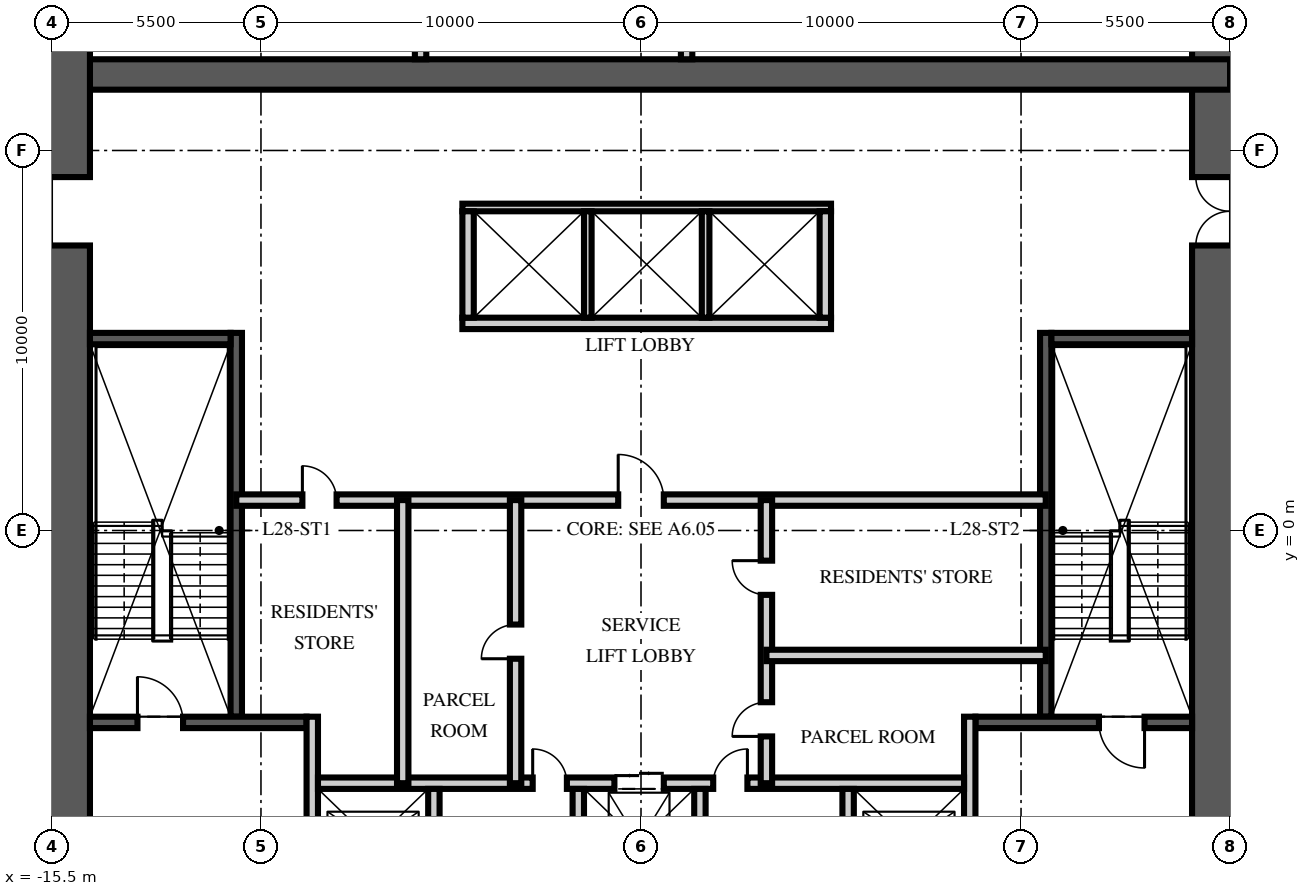
"""IFC4 building model, lengths in metres.
Left out: names, types, materials, properties, quantities, classifications, styles, units other than length and angle.
Written with IfcOpenShell. Run it as: python <this file> out.ifc"""

import sys

from ifc_helpers import new_model, si_unit, direction, frame, frame_2d, origin, place, context, subcontext, project, spatial, rectangle, extrude, element, fill, save


model = new_model("IFC4")
c1 = context("Model", 3, precision=1e-05, world=origin(), true_north=direction((0.0, 1.0)))
c2 = subcontext(c1, "Body", "Model", "MODEL_VIEW")
j1 = project(units=[si_unit("LENGTHUNIT", "METRE"), si_unit("PLANEANGLEUNIT", "RADIAN")], contexts=[c1])
p1 = place(None, origin())
s1 = spatial("IfcSite", under=j1, at=p1, CompositionType="ELEMENT")
p2 = place(p1, origin())
s2 = spatial("IfcBuilding", under=s1, at=p2, CompositionType="ELEMENT")
p3 = place(p2, frame((0.0, 0.0, 114.75)))
s3 = spatial("IfcBuildingStorey", under=s2, at=p3, CompositionType="ELEMENT", Elevation=114.75)
p4 = place(p3, frame((15.5, -15.5, -0.25), z_axis=(0.0, 0.0, 1.0), x_axis=(0.0, 1.0, 0.0)))
e1 = element("IfcWall", 1, at=p4, inside=s3, PredefinedType="SHEAR", context=c2, shape_type="SweptSolid", body=[
    extrude(rectangle(XDim=31.0, YDim=2.0, at=frame_2d((15.5, 0.0))), origin(), (0.0, 0.0, 1.0), 3.75),
])
p5 = place(p4, frame((6.5, 0.0, 0.25)))
e2 = element("IfcOpeningElement", 2, at=p5, cuts=e1, PredefinedType="OPENING", context=c2, shape_type="SweptSolid", body=[
    extrude(rectangle(XDim=1.2, YDim=2.1, at=frame_2d((0.6, 1.05))), frame((0.0, 1.01, 0.0), z_axis=(0.0, -1.0, 0.0), x_axis=(1.0, 0.0, 0.0)), (0.0, 0.0, 1.0), 2.02),
])
p6 = place(p4, frame((23.0, 0.0, 0.25)))
e3 = element("IfcOpeningElement", 3, at=p6, cuts=e1, PredefinedType="OPENING", context=c2, shape_type="SweptSolid", body=[
    extrude(rectangle(XDim=1.8, YDim=2.1, at=frame_2d((0.9, 1.05))), frame((0.0, 1.01, 0.0), z_axis=(0.0, -1.0, 0.0), x_axis=(1.0, 0.0, 0.0)), (0.0, 0.0, 1.0), 2.02),
])
p7 = place(p3, frame((-15.5, 12.0, -0.25), z_axis=(0.0, 0.0, 1.0), x_axis=(1.0, 0.0, 0.0)))
e4 = element("IfcWall", 4, at=p7, inside=s3, PredefinedType="SHEAR", context=c2, shape_type="SweptSolid", body=[
    extrude(rectangle(XDim=31.0, YDim=0.8, at=frame_2d((15.5, 0.0))), origin(), (0.0, 0.0, 1.0), 3.75),
])
p8 = place(p3, frame((-15.5, -15.5, -0.25), z_axis=(0.0, 0.0, 1.0), x_axis=(0.0, 1.0, 0.0)))
e5 = element("IfcWall", 5, at=p8, inside=s3, PredefinedType="SHEAR", context=c2, shape_type="SweptSolid", body=[
    extrude(rectangle(XDim=31.0, YDim=2.0, at=frame_2d((15.5, 0.0))), origin(), (0.0, 0.0, 1.0), 3.75),
])
p9 = place(p8, frame((6.5, 0.0, 0.25)))
e6 = element("IfcOpeningElement", 6, at=p9, cuts=e5, PredefinedType="OPENING", context=c2, shape_type="SweptSolid", body=[
    extrude(rectangle(XDim=1.2, YDim=2.1, at=frame_2d((0.6, 1.05))), frame((0.0, 1.01, 0.0), z_axis=(0.0, -1.0, 0.0), x_axis=(1.0, 0.0, 0.0)), (0.0, 0.0, 1.0), 2.02),
])
p10 = place(p8, frame((23.0, 0.0, 0.25)))
e7 = element("IfcOpeningElement", 7, at=p10, cuts=e5, PredefinedType="OPENING", context=c2, shape_type="SweptSolid", body=[
    extrude(rectangle(XDim=1.8, YDim=2.1, at=frame_2d((0.9, 1.05))), frame((0.0, 1.01, 0.0), z_axis=(0.0, -1.0, 0.0), x_axis=(1.0, 0.0, 0.0)), (0.0, 0.0, 1.0), 2.02),
])
p11 = place(p3, frame((-10.65, -4.9, 0.0), z_axis=(0.0, 0.0, 1.0), x_axis=(0.0, 1.0, 0.0)))
e8 = element("IfcWall", 8, at=p11, inside=s3, PredefinedType="SOLIDWALL", context=c2, shape_type="SweptSolid", body=[
    extrude(rectangle(XDim=10.1, YDim=0.3, at=frame_2d((5.05, 0.0))), origin(), (0.0, 0.0, 1.0), 3.5),
])
p12 = place(p3, frame((-14.5, -5.05, 0.0), z_axis=(0.0, 0.0, 1.0), x_axis=(1.0, 0.0, 0.0)))
e9 = element("IfcWall", 9, at=p12, inside=s3, PredefinedType="SOLIDWALL", context=c2, shape_type="SweptSolid", body=[
    extrude(rectangle(XDim=5.7, YDim=0.3, at=frame_2d((2.85, 0.0))), origin(), (0.0, 0.0, 1.0), 3.5),
])
p13 = place(p12, frame((1.25, 0.0, 0.0)))
e10 = element("IfcOpeningElement", 10, at=p13, cuts=e9, PredefinedType="OPENING", context=c2, shape_type="SweptSolid", body=[
    extrude(rectangle(XDim=1.2, YDim=2.1, at=frame_2d((0.6, 1.05))), frame((0.0, 0.16, 0.0), z_axis=(0.0, -1.0, 0.0), x_axis=(1.0, 0.0, 0.0)), (0.0, 0.0, 1.0), 0.32),
])
p14 = place(p3, frame((-14.5, 5.05, 0.0), z_axis=(0.0, 0.0, 1.0), x_axis=(1.0, 0.0, 0.0)))
e11 = element("IfcWall", 11, at=p14, inside=s3, PredefinedType="SOLIDWALL", context=c2, shape_type="SweptSolid", body=[
    extrude(rectangle(XDim=3.7, YDim=0.3, at=frame_2d((1.85, 0.0))), origin(), (0.0, 0.0, 1.0), 3.5),
])
p15 = place(p3, frame((-8.65, -11.6, 0.0), z_axis=(0.0, 0.0, 1.0), x_axis=(0.0, 1.0, 0.0)))
e12 = element("IfcWall", 12, at=p15, inside=s3, PredefinedType="PARTITIONING", context=c2, shape_type="SweptSolid", body=[
    extrude(rectangle(XDim=6.7, YDim=0.3, at=frame_2d((3.35, 0.0))), origin(), (0.0, 0.0, 1.0), 3.5),
])
p16 = place(p15, frame((2.85, 0.0, 0.0)))
e13 = element("IfcOpeningElement", 13, at=p16, cuts=e12, PredefinedType="OPENING", context=c2, shape_type="SweptSolid", body=[
    extrude(rectangle(XDim=1.1, YDim=2.1, at=frame_2d((0.55, 1.05))), frame((0.0, 0.16, 0.0), z_axis=(0.0, -1.0, 0.0), x_axis=(1.0, 0.0, 0.0)), (0.0, 0.0, 1.0), 0.32),
])
p17 = place(p3, frame((10.65, -4.9, 0.0), z_axis=(0.0, 0.0, 1.0), x_axis=(0.0, 1.0, 0.0)))
e14 = element("IfcWall", 14, at=p17, inside=s3, PredefinedType="SOLIDWALL", context=c2, shape_type="SweptSolid", body=[
    extrude(rectangle(XDim=10.1, YDim=0.3, at=frame_2d((5.05, 0.0))), origin(), (0.0, 0.0, 1.0), 3.5),
])
p18 = place(p3, frame((14.5, -5.05, 0.0), z_axis=(0.0, 0.0, 1.0), x_axis=(-1.0, 0.0, 0.0)))
e15 = element("IfcWall", 15, at=p18, inside=s3, PredefinedType="SOLIDWALL", context=c2, shape_type="SweptSolid", body=[
    extrude(rectangle(XDim=5.7, YDim=0.3, at=frame_2d((2.85, 0.0))), origin(), (0.0, 0.0, 1.0), 3.5),
])
p19 = place(p18, frame((1.25, 0.0, 0.0)))
e16 = element("IfcOpeningElement", 16, at=p19, cuts=e15, PredefinedType="OPENING", context=c2, shape_type="SweptSolid", body=[
    extrude(rectangle(XDim=1.2, YDim=2.1, at=frame_2d((0.6, 1.05))), frame((0.0, 0.16, 0.0), z_axis=(0.0, -1.0, 0.0), x_axis=(1.0, 0.0, 0.0)), (0.0, 0.0, 1.0), 0.32),
])
p20 = place(p3, frame((14.5, 5.05, 0.0), z_axis=(0.0, 0.0, 1.0), x_axis=(-1.0, 0.0, 0.0)))
e17 = element("IfcWall", 17, at=p20, inside=s3, PredefinedType="SOLIDWALL", context=c2, shape_type="SweptSolid", body=[
    extrude(rectangle(XDim=3.7, YDim=0.3, at=frame_2d((1.85, 0.0))), origin(), (0.0, 0.0, 1.0), 3.5),
])
p21 = place(p3, frame((8.65, -11.6, 0.0), z_axis=(0.0, 0.0, 1.0), x_axis=(0.0, 1.0, 0.0)))
e18 = element("IfcWall", 18, at=p21, inside=s3, PredefinedType="PARTITIONING", context=c2, shape_type="SweptSolid", body=[
    extrude(rectangle(XDim=6.7, YDim=0.3, at=frame_2d((3.35, 0.0))), origin(), (0.0, 0.0, 1.0), 3.5),
])
p22 = place(p21, frame((2.85, 0.0, 0.0)))
e19 = element("IfcOpeningElement", 19, at=p22, cuts=e18, PredefinedType="OPENING", context=c2, shape_type="SweptSolid", body=[
    extrude(rectangle(XDim=1.1, YDim=2.1, at=frame_2d((0.55, 1.05))), frame((0.0, 0.16, 0.0), z_axis=(0.0, -1.0, 0.0), x_axis=(1.0, 0.0, 0.0)), (0.0, 0.0, 1.0), 0.32),
])
p23 = place(p3, frame((-8.5, -6.65, 0.0), z_axis=(0.0, 0.0, 1.0), x_axis=(1.0, 0.0, 0.0)))
e20 = element("IfcWall", 20, at=p23, inside=s3, PredefinedType="PARTITIONING", context=c2, shape_type="SweptSolid", body=[
    extrude(rectangle(XDim=17.0, YDim=0.3, at=frame_2d((8.5, 0.0))), origin(), (0.0, 0.0, 1.0), 3.5),
])
p24 = place(p23, frame((7.8, 0.0, 0.0)))
e21 = element("IfcOpeningElement", 21, at=p24, cuts=e20, PredefinedType="OPENING", context=c2, shape_type="SweptSolid", body=[
    extrude(rectangle(XDim=1.3, YDim=2.4, at=frame_2d((0.65, 1.2))), frame((0.0, 0.16, 0.0), z_axis=(0.0, -1.0, 0.0), x_axis=(1.0, 0.0, 0.0)), (0.0, 0.0, 1.0), 0.32),
])
p25 = place(p23, frame((5.65, 0.0, 0.0)))
e22 = element("IfcOpeningElement", 22, at=p25, cuts=e20, PredefinedType="OPENING", context=c2, shape_type="SweptSolid", body=[
    extrude(rectangle(XDim=0.9, YDim=2.1, at=frame_2d((0.45, 1.05))), frame((0.0, 0.16, 0.0), z_axis=(0.0, -1.0, 0.0), x_axis=(1.0, 0.0, 0.0)), (0.0, 0.0, 1.0), 0.32),
])
p26 = place(p23, frame((10.4, 0.0, 0.0)))
e23 = element("IfcOpeningElement", 23, at=p26, cuts=e20, PredefinedType="OPENING", context=c2, shape_type="SweptSolid", body=[
    extrude(rectangle(XDim=0.9, YDim=2.1, at=frame_2d((0.45, 1.05))), frame((0.0, 0.16, 0.0), z_axis=(0.0, -1.0, 0.0), x_axis=(1.0, 0.0, 0.0)), (0.0, 0.0, 1.0), 0.32),
])
for number, where, z_axis, x_axis in (
    (24, (-5.45, -11.6, 0.0), (0.0, 0.0, 1.0), (0.0, 1.0, 0.0)),
    (25, (-1.65, -11.6, 0.0), (0.0, 0.0, 1.0), (0.0, 1.0, 0.0)),
    (26, (1.55, -11.6, 0.0), (0.0, 0.0, 1.0), (0.0, 1.0, 0.0)),
    (27, (5.45, -11.6, 0.0), (0.0, 0.0, 1.0), (0.0, 1.0, 0.0)),
):
    element("IfcWall", number, at=place(p3, frame(where, z_axis=z_axis, x_axis=x_axis)), inside=s3, PredefinedType="PARTITIONING", context=c2, shape_type="SweptSolid", body=[
        extrude(rectangle(XDim=4.8, YDim=0.3, at=frame_2d((2.4, 0.0))), origin(), (0.0, 0.0, 1.0), 3.5),
    ])
p27 = place(p3, frame((-4.7, 5.45, 0.0), z_axis=(0.0, 0.0, 1.0), x_axis=(1.0, 0.0, 0.0)))
e28 = element("IfcWall", 28, at=p27, inside=s3, PredefinedType="PARTITIONING", context=c2, shape_type="SweptSolid", body=[
    extrude(rectangle(XDim=9.7, YDim=0.3, at=frame_2d((4.85, 0.0))), origin(), (0.0, 0.0, 1.0), 3.5),
])
p28 = place(p3, frame((-4.7, 8.5, 0.0), z_axis=(0.0, 0.0, 1.0), x_axis=(1.0, 0.0, 0.0)))
e29 = element("IfcWall", 29, at=p28, inside=s3, PredefinedType="PARTITIONING", context=c2, shape_type="SweptSolid", body=[
    extrude(rectangle(XDim=9.7, YDim=0.2, at=frame_2d((4.85, 0.0))), origin(), (0.0, 0.0, 1.0), 3.5),
])
for number, where, z_axis, x_axis in (
    (30, (-4.55, 5.6, 0.0), (0.0, 0.0, 1.0), (0.0, 1.0, 0.0)),
    (31, (4.85, 5.6, 0.0), (0.0, 0.0, 1.0), (0.0, 1.0, 0.0)),
):
    element("IfcWall", number, at=place(p3, frame(where, z_axis=z_axis, x_axis=x_axis)), inside=s3, PredefinedType="PARTITIONING", context=c2, shape_type="SweptSolid", body=[
        extrude(rectangle(XDim=2.8, YDim=0.3, at=frame_2d((1.4, 0.0))), origin(), (0.0, 0.0, 1.0), 3.5),
    ])
for number, where, z_axis, x_axis in (
    (32, (-1.4, 5.6, 0.0), (0.0, 0.0, 1.0), (0.0, 1.0, 0.0)),
    (33, (1.7, 5.6, 0.0), (0.0, 0.0, 1.0), (0.0, 1.0, 0.0)),
):
    element("IfcWall", number, at=place(p3, frame(where, z_axis=z_axis, x_axis=x_axis)), inside=s3, PredefinedType="PARTITIONING", context=c2, shape_type="SweptSolid", body=[
        extrude(rectangle(XDim=2.8, YDim=0.2, at=frame_2d((1.4, 0.0))), origin(), (0.0, 0.0, 1.0), 3.5),
    ])
p29 = place(p3, frame((-10.65, 0.8, 0.0), z_axis=(0.0, 0.0, 1.0), x_axis=(1.0, 0.0, 0.0)))
e34 = element("IfcWall", 34, at=p29, inside=s3, PredefinedType="PARTITIONING", context=c2, shape_type="SweptSolid", body=[
    extrude(rectangle(XDim=21.3, YDim=0.3, at=frame_2d((10.65, 0.0))), origin(), (0.0, 0.0, 1.0), 3.5),
])
p30 = place(p29, frame((10.05, 0.0, 0.0)))
e35 = element("IfcOpeningElement", 35, at=p30, cuts=e34, PredefinedType="OPENING", context=c2, shape_type="SweptSolid", body=[
    extrude(rectangle(XDim=1.2, YDim=2.1, at=frame_2d((0.6, 1.05))), frame((0.0, 0.16, 0.0), z_axis=(0.0, -1.0, 0.0), x_axis=(1.0, 0.0, 0.0)), (0.0, 0.0, 1.0), 0.32),
])
p31 = place(p29, frame((1.74, 0.0, 0.0)))
e36 = element("IfcOpeningElement", 36, at=p31, cuts=e34, PredefinedType="OPENING", context=c2, shape_type="SweptSolid", body=[
    extrude(rectangle(XDim=0.9, YDim=2.1, at=frame_2d((0.45, 1.05))), frame((0.0, 0.16, 0.0), z_axis=(0.0, -1.0, 0.0), x_axis=(1.0, 0.0, 0.0)), (0.0, 0.0, 1.0), 0.32),
])
p32 = place(p3, frame((-3.3, -6.65, 0.0), z_axis=(0.0, 0.0, 1.0), x_axis=(0.0, 1.0, 0.0)))
e37 = element("IfcWall", 37, at=p32, inside=s3, PredefinedType="PARTITIONING", context=c2, shape_type="SweptSolid", body=[
    extrude(rectangle(XDim=7.45, YDim=0.3, at=frame_2d((3.725, 0.0))), origin(), (0.0, 0.0, 1.0), 3.5),
])
p33 = place(p32, frame((3.275, 0.0, 0.0)))
e38 = element("IfcOpeningElement", 38, at=p33, cuts=e37, PredefinedType="OPENING", context=c2, shape_type="SweptSolid", body=[
    extrude(rectangle(XDim=0.9, YDim=2.1, at=frame_2d((0.45, 1.05))), frame((0.0, 0.16, 0.0), z_axis=(0.0, -1.0, 0.0), x_axis=(1.0, 0.0, 0.0)), (0.0, 0.0, 1.0), 0.32),
])
p34 = place(p3, frame((3.3, -6.65, 0.0), z_axis=(0.0, 0.0, 1.0), x_axis=(0.0, 1.0, 0.0)))
e39 = element("IfcWall", 39, at=p34, inside=s3, PredefinedType="PARTITIONING", context=c2, shape_type="SweptSolid", body=[
    extrude(rectangle(XDim=7.45, YDim=0.3, at=frame_2d((3.725, 0.0))), origin(), (0.0, 0.0, 1.0), 3.5),
])
p35 = place(p34, frame((1.231, 0.0, 0.0)))
e40 = element("IfcOpeningElement", 40, at=p35, cuts=e39, PredefinedType="OPENING", context=c2, shape_type="SweptSolid", body=[
    extrude(rectangle(XDim=0.9, YDim=2.1, at=frame_2d((0.45, 1.05))), frame((0.0, 0.16, 0.0), z_axis=(0.0, -1.0, 0.0), x_axis=(1.0, 0.0, 0.0)), (0.0, 0.0, 1.0), 0.32),
])
p36 = place(p34, frame((4.956, 0.0, 0.0)))
e41 = element("IfcOpeningElement", 41, at=p36, cuts=e39, PredefinedType="OPENING", context=c2, shape_type="SweptSolid", body=[
    extrude(rectangle(XDim=0.9, YDim=2.1, at=frame_2d((0.45, 1.05))), frame((0.0, 0.16, 0.0), z_axis=(0.0, -1.0, 0.0), x_axis=(1.0, 0.0, 0.0)), (0.0, 0.0, 1.0), 0.32),
])
p37 = place(p3, frame((-6.27, -6.65, 0.0), z_axis=(0.0, 0.0, 1.0), x_axis=(0.0, 1.0, 0.0)))
e42 = element("IfcWall", 42, at=p37, inside=s3, PredefinedType="PARTITIONING", context=c2, shape_type="SweptSolid", body=[
    extrude(rectangle(XDim=7.45, YDim=0.3, at=frame_2d((3.725, 0.0))), origin(), (0.0, 0.0, 1.0), 3.5),
])
p38 = place(p3, frame((10.65, -3.288, 0.0), z_axis=(0.0, 0.0, 1.0), x_axis=(-1.0, 0.0, 0.0)))
e43 = element("IfcWall", 43, at=p38, inside=s3, PredefinedType="PARTITIONING", context=c2, shape_type="SweptSolid", body=[
    extrude(rectangle(XDim=7.35, YDim=0.3, at=frame_2d((3.675, 0.0))), origin(), (0.0, 0.0, 1.0), 3.5),
])
p39 = place(p3, frame((-5.8, 12.4, 0.0), z_axis=(0.0, 0.0, 1.0), x_axis=(0.0, 1.0, 0.0)))
e44 = element("IfcWall", 44, at=p39, inside=s3, PredefinedType="PARTITIONING", context=c2, shape_type="SweptSolid", body=[
    extrude(rectangle(XDim=2.1, YDim=0.3, at=frame_2d((1.05, 0.0))), origin(), (0.0, 0.0, 1.0), 3.5),
])
p40 = place(p39, frame((0.6, 0.0, 0.0)))
e45 = element("IfcOpeningElement", 45, at=p40, cuts=e44, PredefinedType="OPENING", context=c2, shape_type="SweptSolid", body=[
    extrude(rectangle(XDim=0.9, YDim=2.1, at=frame_2d((0.45, 1.05))), frame((0.0, 0.16, 0.0), z_axis=(0.0, -1.0, 0.0), x_axis=(1.0, 0.0, 0.0)), (0.0, 0.0, 1.0), 0.32),
])
p41 = place(p3, frame((1.2, 12.4, 0.0), z_axis=(0.0, 0.0, 1.0), x_axis=(0.0, 1.0, 0.0)))
e46 = element("IfcWall", 46, at=p41, inside=s3, PredefinedType="PARTITIONING", context=c2, shape_type="SweptSolid", body=[
    extrude(rectangle(XDim=2.1, YDim=0.3, at=frame_2d((1.05, 0.0))), origin(), (0.0, 0.0, 1.0), 3.5),
])
p42 = place(p41, frame((0.6, 0.0, 0.0)))
e47 = element("IfcOpeningElement", 47, at=p42, cuts=e46, PredefinedType="OPENING", context=c2, shape_type="SweptSolid", body=[
    extrude(rectangle(XDim=0.9, YDim=2.1, at=frame_2d((0.45, 1.05))), frame((0.0, 0.16, 0.0), z_axis=(0.0, -1.0, 0.0), x_axis=(1.0, 0.0, 0.0)), (0.0, 0.0, 1.0), 0.32),
])
p43 = place(p13, origin())
e48 = element("IfcDoor", 48, at=p43, inside=s3, OperationType="SINGLE_SWING_LEFT", PredefinedType="DOOR", context=c2, shape_type="SweptSolid", body=[
    extrude(rectangle(XDim=1.2, YDim=2.1, at=frame_2d((0.6, 1.05))), frame((0.0, 0.025, 0.0), z_axis=(0.0, -1.0, 0.0), x_axis=(1.0, 0.0, 0.0)), (0.0, 0.0, 1.0), 0.05),
])
fill(e10, e48)
p44 = place(p10, origin())
e49 = element("IfcDoor", 49, at=p44, inside=s3, OperationType="DOUBLE_DOOR_SINGLE_SWING", PredefinedType="DOOR", context=c2, shape_type="SweptSolid", body=[
    extrude(rectangle(XDim=1.8, YDim=2.1, at=frame_2d((0.9, 1.05))), frame((0.0, 0.025, 0.0), z_axis=(0.0, -1.0, 0.0), x_axis=(1.0, 0.0, 0.0)), (0.0, 0.0, 1.0), 0.05),
])
fill(e7, e49)
p45 = place(p19, origin())
e50 = element("IfcDoor", 50, at=p45, inside=s3, OperationType="SINGLE_SWING_LEFT", PredefinedType="DOOR", context=c2, shape_type="SweptSolid", body=[
    extrude(rectangle(XDim=1.2, YDim=2.1, at=frame_2d((0.6, 1.05))), frame((0.0, 0.025, 0.0), z_axis=(0.0, -1.0, 0.0), x_axis=(1.0, 0.0, 0.0)), (0.0, 0.0, 1.0), 0.05),
])
fill(e16, e50)
p46 = place(p6, origin())
e51 = element("IfcDoor", 51, at=p46, inside=s3, OperationType="DOUBLE_DOOR_SINGLE_SWING", PredefinedType="DOOR", context=c2, shape_type="SweptSolid", body=[
    extrude(rectangle(XDim=1.8, YDim=2.1, at=frame_2d((0.9, 1.05))), frame((0.0, 0.025, 0.0), z_axis=(0.0, -1.0, 0.0), x_axis=(1.0, 0.0, 0.0)), (0.0, 0.0, 1.0), 0.05),
])
fill(e3, e51)
p47 = place(p24, origin())
e52 = element("IfcDoor", 52, at=p47, inside=s3, OperationType="DOUBLE_DOOR_SLIDING", PredefinedType="DOOR", context=c2, shape_type="SweptSolid", body=[
    extrude(rectangle(XDim=1.3, YDim=2.4, at=frame_2d((0.65, 1.2))), frame((0.0, 0.025, 0.0), z_axis=(0.0, -1.0, 0.0), x_axis=(1.0, 0.0, 0.0)), (0.0, 0.0, 1.0), 0.05),
])
fill(e21, e52)
p48 = place(p30, origin())
e53 = element("IfcDoor", 53, at=p48, inside=s3, OperationType="SINGLE_SWING_LEFT", PredefinedType="DOOR", context=c2, shape_type="SweptSolid", body=[
    extrude(rectangle(XDim=1.2, YDim=2.1, at=frame_2d((0.6, 1.05))), frame((0.0, 0.025, 0.0), z_axis=(0.0, -1.0, 0.0), x_axis=(1.0, 0.0, 0.0)), (0.0, 0.0, 1.0), 0.05),
])
fill(e35, e53)
p49 = place(p25, origin())
e54 = element("IfcDoor", 54, at=p49, inside=s3, OperationType="SINGLE_SWING_LEFT", PredefinedType="DOOR", context=c2, shape_type="SweptSolid", body=[
    extrude(rectangle(XDim=0.9, YDim=2.1, at=frame_2d((0.45, 1.05))), frame((0.0, 0.025, 0.0), z_axis=(0.0, -1.0, 0.0), x_axis=(1.0, 0.0, 0.0)), (0.0, 0.0, 1.0), 0.05),
])
fill(e22, e54)
p50 = place(p26, origin())
e55 = element("IfcDoor", 55, at=p50, inside=s3, OperationType="SINGLE_SWING_RIGHT", PredefinedType="DOOR", context=c2, shape_type="SweptSolid", body=[
    extrude(rectangle(XDim=0.9, YDim=2.1, at=frame_2d((0.45, 1.05))), frame((0.0, 0.025, 0.0), z_axis=(0.0, -1.0, 0.0), x_axis=(1.0, 0.0, 0.0)), (0.0, 0.0, 1.0), 0.05),
])
fill(e23, e55)
p51 = place(p33, origin())
e56 = element("IfcDoor", 56, at=p51, inside=s3, OperationType="SINGLE_SWING_LEFT", PredefinedType="DOOR", context=c2, shape_type="SweptSolid", body=[
    extrude(rectangle(XDim=0.9, YDim=2.1, at=frame_2d((0.45, 1.05))), frame((0.0, 0.025, 0.0), z_axis=(0.0, -1.0, 0.0), x_axis=(1.0, 0.0, 0.0)), (0.0, 0.0, 1.0), 0.05),
])
fill(e38, e56)
p52 = place(p31, origin())
e57 = element("IfcDoor", 57, at=p52, inside=s3, OperationType="SINGLE_SWING_LEFT", PredefinedType="DOOR", context=c2, shape_type="SweptSolid", body=[
    extrude(rectangle(XDim=0.9, YDim=2.1, at=frame_2d((0.45, 1.05))), frame((0.0, 0.025, 0.0), z_axis=(0.0, -1.0, 0.0), x_axis=(1.0, 0.0, 0.0)), (0.0, 0.0, 1.0), 0.05),
])
fill(e36, e57)
p53 = place(p35, origin())
e58 = element("IfcDoor", 58, at=p53, inside=s3, OperationType="SINGLE_SWING_LEFT", PredefinedType="DOOR", context=c2, shape_type="SweptSolid", body=[
    extrude(rectangle(XDim=0.9, YDim=2.1, at=frame_2d((0.45, 1.05))), frame((0.0, 0.025, 0.0), z_axis=(0.0, -1.0, 0.0), x_axis=(1.0, 0.0, 0.0)), (0.0, 0.0, 1.0), 0.05),
])
fill(e40, e58)
p54 = place(p36, origin())
e59 = element("IfcDoor", 59, at=p54, inside=s3, OperationType="SINGLE_SWING_RIGHT", PredefinedType="DOOR", context=c2, shape_type="SweptSolid", body=[
    extrude(rectangle(XDim=0.9, YDim=2.1, at=frame_2d((0.45, 1.05))), frame((0.0, 0.025, 0.0), z_axis=(0.0, -1.0, 0.0), x_axis=(1.0, 0.0, 0.0)), (0.0, 0.0, 1.0), 0.05),
])
fill(e41, e59)
save(model, sys.argv[1])
